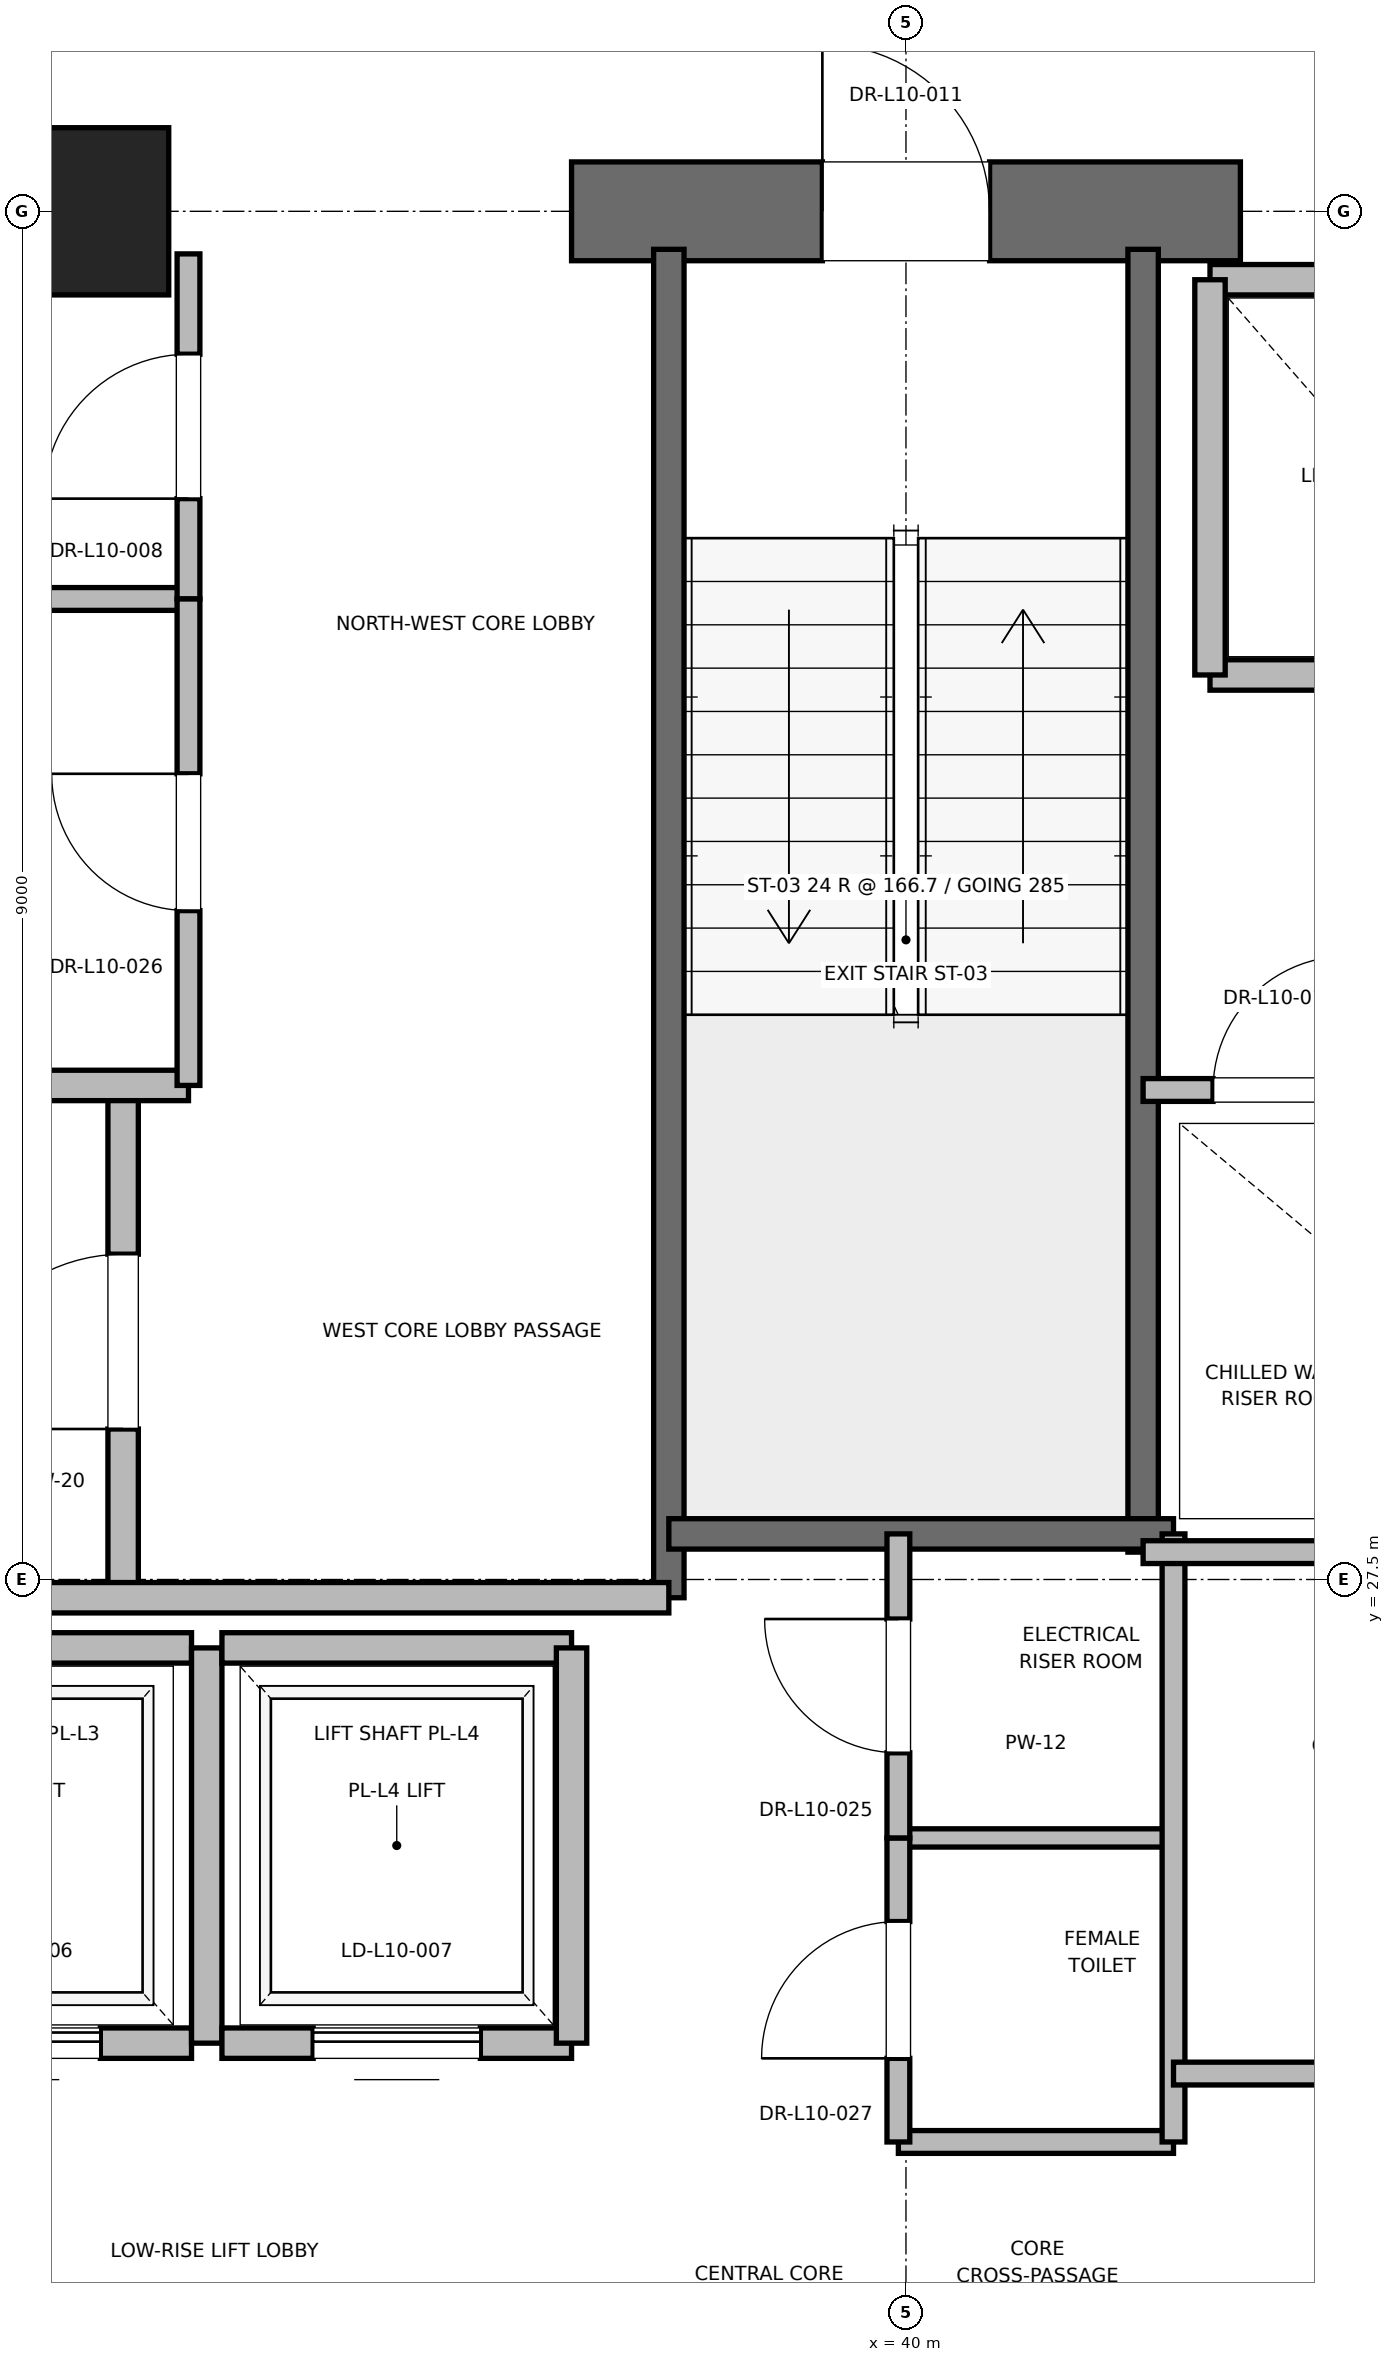
"""IFC4 building model, lengths in metres.
Left out: names, types, materials, properties, quantities, classifications, styles, units other than length and angle.
Written with IfcOpenShell. Run it as: python <this file> out.ifc"""

import sys

from ifc_helpers import new_model, si_unit, direction, frame, frame_2d, origin, origin_2d, place, context, subcontext, project, spatial, rectangle, extrude, element, fill, save


model = new_model("IFC4")
c1 = context("Model", 3, precision=1e-05, world=origin(), true_north=direction((0.0, 1.0)))
c2 = subcontext(c1, "Body", "Model", "MODEL_VIEW")
j1 = project(units=[si_unit("LENGTHUNIT", "METRE"), si_unit("PLANEANGLEUNIT", "RADIAN")], contexts=[c1])
p1 = place(None, origin())
s1 = spatial("IfcSite", under=j1, at=p1, CompositionType="ELEMENT")
p2 = place(p1, origin())
s2 = spatial("IfcBuilding", under=s1, at=p2, CompositionType="ELEMENT")
p3 = place(p2, frame((0.0, 0.0, 47.6)))
s3 = spatial("IfcBuildingStorey", under=s2, at=p3, CompositionType="ELEMENT", Elevation=47.6)
p4 = place(p3, frame((34.6, 36.5, 0.0), z_axis=(0.0, 0.0, 1.0), x_axis=(1.0, 0.0, 0.0)))
e1 = element("IfcColumn", 1, at=p4, inside=s3, PredefinedType="PILASTER", context=c2, shape_type="SweptSolid", body=[
    extrude(rectangle(XDim=1.1, YDim=1.1, at=origin_2d()), origin(), (0.0, 0.0, 1.0), 4.0),
])
p5 = place(p3, frame((29.0, 36.5, 0.0), z_axis=(0.0, 0.0, 1.0), x_axis=(1.0, 0.0, 0.0)))
e2 = element("IfcWall", 2, at=p5, inside=s3, PredefinedType="SHEAR", context=c2, shape_type="SweptSolid", body=[
    extrude(rectangle(XDim=5.8, YDim=0.65, at=frame_2d((2.9, 0.0))), origin(), (0.0, 0.0, 1.0), 3.76),
])
p6 = place(p3, frame((37.8, 36.5, 0.0), z_axis=(0.0, 0.0, 1.0), x_axis=(1.0, 0.0, 0.0)))
e3 = element("IfcWall", 3, at=p6, inside=s3, PredefinedType="SHEAR", context=c2, shape_type="SweptSolid", body=[
    extrude(rectangle(XDim=4.4, YDim=0.65, at=frame_2d((2.2, 0.0))), origin(), (0.0, 0.0, 1.0), 3.76),
])
p7 = place(p6, frame((1.65, 0.0, 0.0)))
e4 = element("IfcOpeningElement", 4, at=p7, cuts=e3, PredefinedType="OPENING", context=c2, shape_type="SweptSolid", body=[
    extrude(rectangle(XDim=1.1, YDim=2.15, at=frame_2d((0.55, 1.075))), frame((0.0, 0.325, 0.0), z_axis=(0.0, -1.0, 0.0), x_axis=(1.0, 0.0, 0.0)), (0.0, 0.0, 1.0), 0.65),
])
p8 = place(p3, frame((38.44, 27.38, 0.0), z_axis=(0.0, 0.0, 1.0), x_axis=(0.0, 1.0, 0.0)))
e5 = element("IfcWall", 5, at=p8, inside=s3, PredefinedType="SOLIDWALL", context=c2, shape_type="SweptSolid", body=[
    extrude(rectangle(XDim=8.87, YDim=0.2, at=frame_2d((4.435, 0.0))), origin(), (0.0, 0.0, 1.0), 3.76),
])
p9 = place(p3, frame((41.56, 27.68, 0.0), z_axis=(0.0, 0.0, 1.0), x_axis=(0.0, 1.0, 0.0)))
e6 = element("IfcWall", 6, at=p9, inside=s3, PredefinedType="SOLIDWALL", context=c2, shape_type="SweptSolid", body=[
    extrude(rectangle(XDim=8.57, YDim=0.2, at=frame_2d((4.285, 0.0))), origin(), (0.0, 0.0, 1.0), 3.76),
])
p10 = place(p3, frame((38.44, 27.8, 0.0), z_axis=(0.0, 0.0, 1.0), x_axis=(1.0, 0.0, 0.0)))
e7 = element("IfcWall", 7, at=p10, inside=s3, PredefinedType="SOLIDWALL", context=c2, shape_type="SweptSolid", body=[
    extrude(rectangle(XDim=3.32, YDim=0.2, at=frame_2d((1.66, 0.0))), origin(), (0.0, 0.0, 1.0), 3.76),
])
p11 = place(p3, frame((34.85, 27.38, 0.0), z_axis=(0.0, 0.0, 1.0), x_axis=(0.0, 1.0, 0.0)))
e8 = element("IfcWall", 8, at=p11, inside=s3, PredefinedType="PARTITIONING", context=c2, shape_type="SweptSolid", body=[
    extrude(rectangle(XDim=3.37, YDim=0.2, at=frame_2d((1.685, 0.0))), origin(), (0.0, 0.0, 1.0), 3.76),
])
p12 = place(p11, frame((1.11, 0.0, 0.0)))
e9 = element("IfcOpeningElement", 9, at=p12, cuts=e8, PredefinedType="OPENING", context=c2, shape_type="SweptSolid", body=[
    extrude(rectangle(XDim=1.15, YDim=2.2, at=frame_2d((0.575, 1.1))), frame((0.0, 0.1, 0.0), z_axis=(0.0, -1.0, 0.0), x_axis=(1.0, 0.0, 0.0)), (0.0, 0.0, 1.0), 0.2),
])
p13 = place(p3, frame((32.82, 27.38, 0.0), z_axis=(0.0, 0.0, 1.0), x_axis=(1.0, 0.0, 0.0)))
e10 = element("IfcWall", 10, at=p13, inside=s3, PredefinedType="PARTITIONING", context=c2, shape_type="SweptSolid", body=[
    extrude(rectangle(XDim=5.62, YDim=0.2, at=frame_2d((2.81, 0.0))), origin(), (0.0, 0.0, 1.0), 3.76),
])
p14 = place(p3, frame((32.15, 30.75, 0.0), z_axis=(0.0, 0.0, 1.0), x_axis=(1.0, 0.0, 0.0)))
e11 = element("IfcWall", 11, at=p14, inside=s3, PredefinedType="PARTITIONING", context=c2, shape_type="SweptSolid", body=[
    extrude(rectangle(XDim=3.13, YDim=0.2, at=frame_2d((1.565, 0.0))), origin(), (0.0, 0.0, 1.0), 3.76),
])
p15 = place(p3, frame((33.0, 24.45, 0.0), z_axis=(0.0, 0.0, 1.0), x_axis=(1.0, 0.0, 0.0)))
e12 = element("IfcWall", 12, at=p15, inside=s3, PredefinedType="SOLIDWALL", context=c2, shape_type="SweptSolid", body=[
    extrude(rectangle(XDim=2.3, YDim=0.2, at=frame_2d((1.15, 0.0))), origin(), (0.0, 0.0, 1.0), 3.76),
])
p16 = place(p15, frame((0.6, 0.0, 0.0)))
e13 = element("IfcOpeningElement", 13, at=p16, cuts=e12, PredefinedType="OPENING", context=c2, shape_type="SweptSolid", body=[
    extrude(rectangle(XDim=1.1, YDim=2.2, at=frame_2d((0.55, 1.1))), frame((0.0, 0.1, 0.0), z_axis=(0.0, -1.0, 0.0), x_axis=(1.0, 0.0, 0.0)), (0.0, 0.0, 1.0), 0.2),
])
p17 = place(p3, frame((35.3, 27.05, 0.0), z_axis=(0.0, 0.0, 1.0), x_axis=(-1.0, 0.0, 0.0)))
e14 = element("IfcWall", 14, at=p17, inside=s3, PredefinedType="SOLIDWALL", context=c2, shape_type="SweptSolid", body=[
    extrude(rectangle(XDim=2.3, YDim=0.2, at=frame_2d((1.15, 0.0))), origin(), (0.0, 0.0, 1.0), 3.76),
])
p18 = place(p3, frame((35.4, 24.45, 0.0), z_axis=(0.0, 0.0, 1.0), x_axis=(0.0, 1.0, 0.0)))
e15 = element("IfcWall", 15, at=p18, inside=s3, PredefinedType="SOLIDWALL", context=c2, shape_type="SweptSolid", body=[
    extrude(rectangle(XDim=2.6, YDim=0.2, at=frame_2d((1.3, 0.0))), origin(), (0.0, 0.0, 1.0), 3.76),
])
p19 = place(p3, frame((35.5, 24.45, 0.0), z_axis=(0.0, 0.0, 1.0), x_axis=(1.0, 0.0, 0.0)))
e16 = element("IfcWall", 16, at=p19, inside=s3, PredefinedType="SOLIDWALL", context=c2, shape_type="SweptSolid", body=[
    extrude(rectangle(XDim=2.3, YDim=0.2, at=frame_2d((1.15, 0.0))), origin(), (0.0, 0.0, 1.0), 3.76),
])
p20 = place(p19, frame((0.6, 0.0, 0.0)))
e17 = element("IfcOpeningElement", 17, at=p20, cuts=e16, PredefinedType="OPENING", context=c2, shape_type="SweptSolid", body=[
    extrude(rectangle(XDim=1.1, YDim=2.2, at=frame_2d((0.55, 1.1))), frame((0.0, 0.1, 0.0), z_axis=(0.0, -1.0, 0.0), x_axis=(1.0, 0.0, 0.0)), (0.0, 0.0, 1.0), 0.2),
])
p21 = place(p3, frame((37.8, 27.05, 0.0), z_axis=(0.0, 0.0, 1.0), x_axis=(-1.0, 0.0, 0.0)))
e18 = element("IfcWall", 18, at=p21, inside=s3, PredefinedType="SOLIDWALL", context=c2, shape_type="SweptSolid", body=[
    extrude(rectangle(XDim=2.3, YDim=0.2, at=frame_2d((1.15, 0.0))), origin(), (0.0, 0.0, 1.0), 3.76),
])
p22 = place(p3, frame((37.8, 24.45, 0.0), z_axis=(0.0, 0.0, 1.0), x_axis=(0.0, 1.0, 0.0)))
e19 = element("IfcWall", 19, at=p22, inside=s3, PredefinedType="SOLIDWALL", context=c2, shape_type="SweptSolid", body=[
    extrude(rectangle(XDim=2.6, YDim=0.2, at=frame_2d((1.3, 0.0))), origin(), (0.0, 0.0, 1.0), 3.76),
])
p23 = place(p3, frame((42.0, 33.45, 0.0), z_axis=(0.0, 0.0, 1.0), x_axis=(1.0, 0.0, 0.0)))
e20 = element("IfcWall", 20, at=p23, inside=s3, PredefinedType="SOLIDWALL", context=c2, shape_type="SweptSolid", body=[
    extrude(rectangle(XDim=2.3, YDim=0.2, at=frame_2d((1.15, 0.0))), origin(), (0.0, 0.0, 1.0), 3.76),
])
p24 = place(p3, frame((44.3, 36.05, 0.0), z_axis=(0.0, 0.0, 1.0), x_axis=(-1.0, 0.0, 0.0)))
e21 = element("IfcWall", 21, at=p24, inside=s3, PredefinedType="SOLIDWALL", context=c2, shape_type="SweptSolid", body=[
    extrude(rectangle(XDim=2.3, YDim=0.2, at=frame_2d((1.15, 0.0))), origin(), (0.0, 0.0, 1.0), 2.54),
])
p25 = place(p3, frame((42.0, 36.05, 0.0), z_axis=(0.0, 0.0, 1.0), x_axis=(0.0, -1.0, 0.0)))
e22 = element("IfcWall", 22, at=p25, inside=s3, PredefinedType="SOLIDWALL", context=c2, shape_type="SweptSolid", body=[
    extrude(rectangle(XDim=2.6, YDim=0.2, at=frame_2d((1.3, 0.0))), origin(), (0.0, 0.0, 1.0), 2.54),
])
p26 = place(p3, frame((39.95, 23.8, 0.0), z_axis=(0.0, 0.0, 1.0), x_axis=(1.0, 0.0, 0.0)))
e23 = element("IfcWall", 23, at=p26, inside=s3, PredefinedType="PARTITIONING", context=c2, shape_type="SweptSolid", body=[
    extrude(rectangle(XDim=1.81, YDim=0.15, at=frame_2d((0.905, 0.0))), origin(), (0.0, 0.0, 1.0), 2.85),
])
p27 = place(p3, frame((39.95, 25.8, 0.0), z_axis=(0.0, 0.0, 1.0), x_axis=(1.0, 0.0, 0.0)))
e24 = element("IfcWall", 24, at=p27, inside=s3, PredefinedType="PARTITIONING", context=c2, shape_type="SweptSolid", body=[
    extrude(rectangle(XDim=1.81, YDim=0.12, at=frame_2d((0.905, 0.0))), origin(), (0.0, 0.0, 1.0), 2.85),
])
p28 = place(p3, frame((41.76, 23.8, 0.0), z_axis=(0.0, 0.0, 1.0), x_axis=(0.0, 1.0, 0.0)))
e25 = element("IfcWall", 25, at=p28, inside=s3, PredefinedType="PARTITIONING", context=c2, shape_type="SweptSolid", body=[
    extrude(rectangle(XDim=4.0, YDim=0.15, at=frame_2d((2.0, 0.0))), origin(), (0.0, 0.0, 1.0), 2.85),
])
p29 = place(p3, frame((39.95, 23.8, 0.0), z_axis=(0.0, 0.0, 1.0), x_axis=(0.0, 1.0, 0.0)))
e26 = element("IfcWall", 26, at=p29, inside=s3, PredefinedType="PARTITIONING", context=c2, shape_type="SweptSolid", body=[
    extrude(rectangle(XDim=2.0, YDim=0.15, at=frame_2d((1.0, 0.0))), origin(), (0.0, 0.0, 1.0), 2.85),
])
p30 = place(p29, frame((0.55, 0.0, 0.0)))
e27 = element("IfcOpeningElement", 27, at=p30, cuts=e26, PredefinedType="OPENING", context=c2, shape_type="SweptSolid", body=[
    extrude(rectangle(XDim=0.9, YDim=2.1, at=frame_2d((0.45, 1.05))), frame((0.0, 0.075, 0.0), z_axis=(0.0, -1.0, 0.0), x_axis=(1.0, 0.0, 0.0)), (0.0, 0.0, 1.0), 0.15),
])
p31 = place(p3, frame((39.95, 25.8, 0.0), z_axis=(0.0, 0.0, 1.0), x_axis=(0.0, 1.0, 0.0)))
e28 = element("IfcWall", 28, at=p31, inside=s3, PredefinedType="PARTITIONING", context=c2, shape_type="SweptSolid", body=[
    extrude(rectangle(XDim=2.0, YDim=0.15, at=frame_2d((1.0, 0.0))), origin(), (0.0, 0.0, 1.0), 2.85),
])
p32 = place(p31, frame((0.56, 0.0, 0.0)))
e29 = element("IfcOpeningElement", 29, at=p32, cuts=e28, PredefinedType="OPENING", context=c2, shape_type="SweptSolid", body=[
    extrude(rectangle(XDim=0.88, YDim=2.1, at=frame_2d((0.44, 1.05))), frame((0.0, 0.075, 0.0), z_axis=(0.0, -1.0, 0.0), x_axis=(1.0, 0.0, 0.0)), (0.0, 0.0, 1.0), 0.15),
])
p33 = place(p3, frame((32.15, 33.95, 0.0), z_axis=(0.0, 0.0, 1.0), x_axis=(1.0, 0.0, 0.0)))
e30 = element("IfcWall", 30, at=p33, inside=s3, PredefinedType="PARTITIONING", context=c2, shape_type="SweptSolid", body=[
    extrude(rectangle(XDim=3.13, YDim=0.15, at=frame_2d((1.565, 0.0))), origin(), (0.0, 0.0, 1.0), 2.85),
])
p34 = place(p3, frame((35.28, 33.95, 0.0), z_axis=(0.0, 0.0, 1.0), x_axis=(0.0, 1.0, 0.0)))
e31 = element("IfcWall", 31, at=p34, inside=s3, PredefinedType="PARTITIONING", context=c2, shape_type="SweptSolid", body=[
    extrude(rectangle(XDim=2.27, YDim=0.15, at=frame_2d((1.135, 0.0))), origin(), (0.0, 0.0, 1.0), 2.54),
])
p35 = place(p34, frame((0.66, 0.0, 0.0)))
e32 = element("IfcOpeningElement", 32, at=p35, cuts=e31, PredefinedType="OPENING", context=c2, shape_type="SweptSolid", body=[
    extrude(rectangle(XDim=0.95, YDim=2.15, at=frame_2d((0.475, 1.075))), frame((0.0, 0.075, 0.0), z_axis=(0.0, -1.0, 0.0), x_axis=(1.0, 0.0, 0.0)), (0.0, 0.0, 1.0), 0.15),
])
p36 = place(p3, frame((35.28, 30.75, 0.0), z_axis=(0.0, 0.0, 1.0), x_axis=(0.0, 1.0, 0.0)))
e33 = element("IfcWall", 33, at=p36, inside=s3, PredefinedType="PARTITIONING", context=c2, shape_type="SweptSolid", body=[
    extrude(rectangle(XDim=3.2, YDim=0.15, at=frame_2d((1.6, 0.0))), origin(), (0.0, 0.0, 1.0), 2.85),
])
p37 = place(p36, frame((1.15, 0.0, 0.0)))
e34 = element("IfcOpeningElement", 34, at=p37, cuts=e33, PredefinedType="OPENING", context=c2, shape_type="SweptSolid", body=[
    extrude(rectangle(XDim=0.9, YDim=2.1, at=frame_2d((0.45, 1.05))), frame((0.0, 0.075, 0.0), z_axis=(0.0, -1.0, 0.0), x_axis=(1.0, 0.0, 0.0)), (0.0, 0.0, 1.0), 0.15),
])
p38 = place(p3, frame((41.56, 27.68, 0.0), z_axis=(0.0, 0.0, 1.0), x_axis=(1.0, 0.0, 0.0)))
e35 = element("IfcWall", 35, at=p38, inside=s3, PredefinedType="PARTITIONING", context=c2, shape_type="SweptSolid", body=[
    extrude(rectangle(XDim=3.59, YDim=0.15, at=frame_2d((1.795, 0.0))), origin(), (0.0, 0.0, 1.0), 2.85),
])
p39 = place(p3, frame((41.76, 24.25, 0.0), z_axis=(0.0, 0.0, 1.0), x_axis=(1.0, 0.0, 0.0)))
e36 = element("IfcWall", 36, at=p39, inside=s3, PredefinedType="PARTITIONING", context=c2, shape_type="SweptSolid", body=[
    extrude(rectangle(XDim=3.39, YDim=0.15, at=frame_2d((1.695, 0.0))), origin(), (0.0, 0.0, 1.0), 2.85),
])
p40 = place(p39, frame((1.255, 0.0, 0.0)))
e37 = element("IfcOpeningElement", 37, at=p40, cuts=e36, PredefinedType="OPENING", context=c2, shape_type="SweptSolid", body=[
    extrude(rectangle(XDim=0.88, YDim=2.1, at=frame_2d((0.44, 1.05))), frame((0.0, 0.075, 0.0), z_axis=(0.0, -1.0, 0.0), x_axis=(1.0, 0.0, 0.0)), (0.0, 0.0, 1.0), 0.15),
])
p41 = place(p3, frame((41.56, 30.72, 0.0), z_axis=(0.0, 0.0, 1.0), x_axis=(1.0, 0.0, 0.0)))
e38 = element("IfcWall", 38, at=p41, inside=s3, PredefinedType="PARTITIONING", context=c2, shape_type="SweptSolid", body=[
    extrude(rectangle(XDim=1.8, YDim=0.15, at=frame_2d((0.9, 0.0))), origin(), (0.0, 0.0, 1.0), 2.85),
])
p42 = place(p41, frame((0.46, 0.0, 0.0)))
e39 = element("IfcOpeningElement", 39, at=p42, cuts=e38, PredefinedType="OPENING", context=c2, shape_type="SweptSolid", body=[
    extrude(rectangle(XDim=0.88, YDim=2.1, at=frame_2d((0.44, 1.05))), frame((0.0, 0.075, 0.0), z_axis=(0.0, -1.0, 0.0), x_axis=(1.0, 0.0, 0.0)), (0.0, 0.0, 1.0), 0.15),
])
p43 = place(p7, origin())
e40 = element("IfcDoor", 40, at=p43, inside=s3, OperationType="SINGLE_SWING_LEFT", PredefinedType="DOOR", context=c2, shape_type="SweptSolid", body=[
    extrude(rectangle(XDim=1.1, YDim=2.15, at=frame_2d((0.55, 1.075))), frame((0.0, 0.025, 0.0), z_axis=(0.0, -1.0, 0.0), x_axis=(1.0, 0.0, 0.0)), (0.0, 0.0, 1.0), 0.05),
])
fill(e4, e40)
p44 = place(p12, origin())
e41 = element("IfcDoor", 41, at=p44, inside=s3, OperationType="SINGLE_SWING_LEFT", PredefinedType="DOOR", context=c2, shape_type="SweptSolid", body=[
    extrude(rectangle(XDim=1.15, YDim=2.2, at=frame_2d((0.575, 1.1))), frame((0.0, 0.025, 0.0), z_axis=(0.0, -1.0, 0.0), x_axis=(1.0, 0.0, 0.0)), (0.0, 0.0, 1.0), 0.05),
])
fill(e9, e41)
p45 = place(p16, origin())
e42 = element("IfcDoor", 42, at=p45, inside=s3, OperationType="SLIDING_TO_RIGHT", PredefinedType="DOOR", context=c2, shape_type="SweptSolid", body=[
    extrude(rectangle(XDim=1.1, YDim=2.2, at=frame_2d((0.55, 1.1))), frame((0.0, 0.025, 0.0), z_axis=(0.0, -1.0, 0.0), x_axis=(1.0, 0.0, 0.0)), (0.0, 0.0, 1.0), 0.05),
])
fill(e13, e42)
p46 = place(p20, origin())
e43 = element("IfcDoor", 43, at=p46, inside=s3, OperationType="SLIDING_TO_RIGHT", PredefinedType="DOOR", context=c2, shape_type="SweptSolid", body=[
    extrude(rectangle(XDim=1.1, YDim=2.2, at=frame_2d((0.55, 1.1))), frame((0.0, 0.025, 0.0), z_axis=(0.0, -1.0, 0.0), x_axis=(1.0, 0.0, 0.0)), (0.0, 0.0, 1.0), 0.05),
])
fill(e17, e43)
p47 = place(p30, origin())
e44 = element("IfcDoor", 44, at=p47, inside=s3, OperationType="SINGLE_SWING_LEFT", PredefinedType="DOOR", context=c2, shape_type="SweptSolid", body=[
    extrude(rectangle(XDim=0.9, YDim=2.1, at=frame_2d((0.45, 1.05))), frame((0.0, 0.025, 0.0), z_axis=(0.0, -1.0, 0.0), x_axis=(1.0, 0.0, 0.0)), (0.0, 0.0, 1.0), 0.05),
])
fill(e27, e44)
p48 = place(p32, origin())
e45 = element("IfcDoor", 45, at=p48, inside=s3, OperationType="SINGLE_SWING_RIGHT", PredefinedType="DOOR", context=c2, shape_type="SweptSolid", body=[
    extrude(rectangle(XDim=0.88, YDim=2.1, at=frame_2d((0.44, 1.05))), frame((0.0, 0.025, 0.0), z_axis=(0.0, -1.0, 0.0), x_axis=(1.0, 0.0, 0.0)), (0.0, 0.0, 1.0), 0.05),
])
fill(e29, e45)
p49 = place(p35, origin())
e46 = element("IfcDoor", 46, at=p49, inside=s3, OperationType="SINGLE_SWING_LEFT", PredefinedType="DOOR", context=c2, shape_type="SweptSolid", body=[
    extrude(rectangle(XDim=0.95, YDim=2.15, at=frame_2d((0.475, 1.075))), frame((0.0, 0.025, 0.0), z_axis=(0.0, -1.0, 0.0), x_axis=(1.0, 0.0, 0.0)), (0.0, 0.0, 1.0), 0.05),
])
fill(e32, e46)
p50 = place(p37, origin())
e47 = element("IfcDoor", 47, at=p50, inside=s3, OperationType="SINGLE_SWING_RIGHT", PredefinedType="DOOR", context=c2, shape_type="SweptSolid", body=[
    extrude(rectangle(XDim=0.9, YDim=2.1, at=frame_2d((0.45, 1.05))), frame((0.0, 0.025, 0.0), z_axis=(0.0, -1.0, 0.0), x_axis=(1.0, 0.0, 0.0)), (0.0, 0.0, 1.0), 0.05),
])
fill(e34, e47)
p51 = place(p42, origin())
e48 = element("IfcDoor", 48, at=p51, inside=s3, OperationType="SINGLE_SWING_RIGHT", PredefinedType="DOOR", context=c2, shape_type="SweptSolid", body=[
    extrude(rectangle(XDim=0.88, YDim=2.1, at=frame_2d((0.44, 1.05))), frame((0.0, 0.025, 0.0), z_axis=(0.0, -1.0, 0.0), x_axis=(1.0, 0.0, 0.0)), (0.0, 0.0, 1.0), 0.05),
])
fill(e39, e48)
save(model, sys.argv[1])
